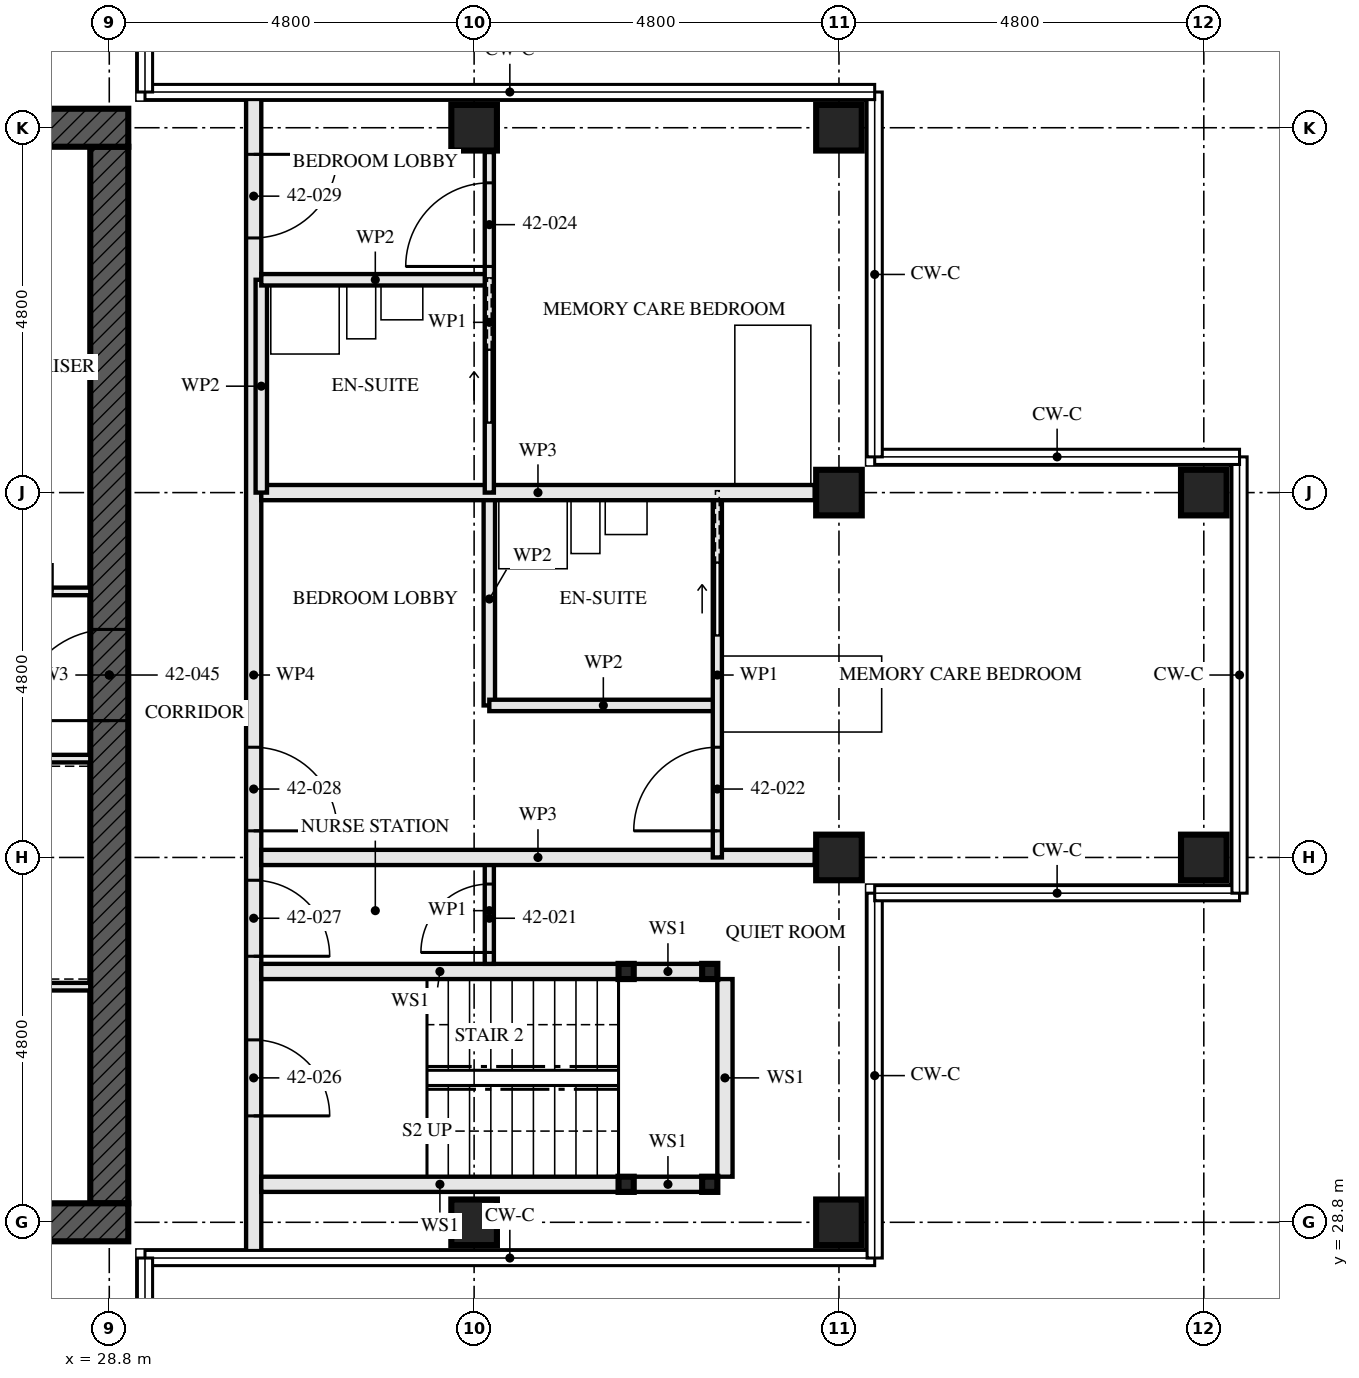
"""IFC4 building model, lengths in metres.
Left out: names, types, materials, properties, quantities, classifications, styles, units other than length and angle.
Written with IfcOpenShell. Run it as: python <this file> out.ifc"""

import sys

from ifc_helpers import new_model, si_unit, direction, frame, frame_2d, origin, origin_2d, place, context, subcontext, project, spatial, rectangle, hollow_rectangle, extrude, element, fill, save


model = new_model("IFC4")
c1 = context("Model", 3, precision=1e-05, world=origin(), true_north=direction((0.0, 1.0)))
c2 = subcontext(c1, "Body", "Model", "MODEL_VIEW")
j1 = project(units=[si_unit("LENGTHUNIT", "METRE"), si_unit("PLANEANGLEUNIT", "RADIAN")], contexts=[c1])
p1 = place(None, origin())
s1 = spatial("IfcSite", under=j1, at=p1, CompositionType="ELEMENT")
p2 = place(p1, origin())
s2 = spatial("IfcBuilding", under=s1, at=p2, CompositionType="ELEMENT")
p3 = place(p2, frame((0.0, 0.0, 155.0)))
s3 = spatial("IfcBuildingStorey", under=s2, at=p3, CompositionType="ELEMENT", Elevation=155.0)
for number, where, z_axis, x_axis in (
    (1, (33.6, 28.8, 0.0), (0.0, 0.0, 1.0), (0.0, 1.0, 0.0)),
    (2, (33.6, 43.2, 0.0), (0.0, 0.0, 1.0), (0.0, 1.0, 0.0)),
):
    element("IfcColumn", number, at=place(p3, frame(where, z_axis=z_axis, x_axis=x_axis)), inside=s3, PredefinedType="COLUMN", context=c2, shape_type="SweptSolid", body=[
        extrude(hollow_rectangle(XDim=0.6, YDim=0.6, WallThickness=0.08, at=origin_2d()), origin(), (0.0, 0.0, 1.0), 3.5),
    ])
for number, where, z_axis, x_axis in (
    (3, (38.4, 28.8, 0.0), (0.0, 0.0, 1.0), (0.0, 1.0, 0.0)),
    (4, (38.4, 33.6, 0.0), (0.0, 0.0, 1.0), (0.0, 1.0, 0.0)),
    (5, (38.4, 38.4, 0.0), (0.0, 0.0, 1.0), (0.0, 1.0, 0.0)),
    (6, (38.4, 43.2, 0.0), (0.0, 0.0, 1.0), (0.0, 1.0, 0.0)),
    (7, (43.2, 33.6, 0.0), (0.0, 0.0, 1.0), (0.0, 1.0, 0.0)),
    (8, (43.2, 38.4, 0.0), (0.0, 0.0, 1.0), (0.0, 1.0, 0.0)),
):
    element("IfcColumn", number, at=place(p3, frame(where, z_axis=z_axis, x_axis=x_axis)), inside=s3, PredefinedType="COLUMN", context=c2, shape_type="SweptSolid", body=[
        extrude(hollow_rectangle(XDim=0.6, YDim=0.6, WallThickness=0.06, at=origin_2d()), origin(), (0.0, 0.0, 1.0), 3.5),
    ])
p4 = place(p3, frame((14.15, 28.8, -0.17), z_axis=(0.0, 0.0, 1.0), x_axis=(1.0, 0.0, 0.0)))
e9 = element("IfcWall", 9, at=p4, inside=s3, PredefinedType="SHEAR", context=c2, shape_type="SweptSolid", body=[
    extrude(rectangle(XDim=14.9, YDim=0.5, at=frame_2d((7.45, 0.0))), origin(), (0.0, 0.0, 1.0), 3.5),
])
p5 = place(p4, frame((6.85, 0.0, 0.17)))
e10 = element("IfcOpeningElement", 10, at=p5, cuts=e9, PredefinedType="OPENING", context=c2, shape_type="SweptSolid", body=[
    extrude(rectangle(XDim=1.2, YDim=2.1, at=frame_2d((0.6, 1.05))), frame((0.0, 0.26, 0.0), z_axis=(0.0, -1.0, 0.0), x_axis=(1.0, 0.0, 0.0)), (0.0, 0.0, 1.0), 0.521),
])
p6 = place(p3, frame((29.05, 43.2, -0.17), z_axis=(0.0, 0.0, 1.0), x_axis=(-1.0, 0.0, 0.0)))
e11 = element("IfcWall", 11, at=p6, inside=s3, PredefinedType="SHEAR", context=c2, shape_type="SweptSolid", body=[
    extrude(rectangle(XDim=14.9, YDim=0.5, at=frame_2d((7.45, 0.0))), origin(), (0.0, 0.0, 1.0), 3.5),
])
p7 = place(p6, frame((6.85, 0.0, 0.17)))
e12 = element("IfcOpeningElement", 12, at=p7, cuts=e11, PredefinedType="OPENING", context=c2, shape_type="SweptSolid", body=[
    extrude(rectangle(XDim=1.2, YDim=2.1, at=frame_2d((0.6, 1.05))), frame((0.0, 0.26, 0.0), z_axis=(0.0, -1.0, 0.0), x_axis=(1.0, 0.0, 0.0)), (0.0, 0.0, 1.0), 0.521),
])
p8 = place(p3, frame((28.8, 29.05, -0.17), z_axis=(0.0, 0.0, 1.0), x_axis=(0.0, 1.0, 0.0)))
e13 = element("IfcWall", 13, at=p8, inside=s3, PredefinedType="SHEAR", context=c2, shape_type="SweptSolid", body=[
    extrude(rectangle(XDim=13.9, YDim=0.5, at=frame_2d((6.95, 0.0))), origin(), (0.0, 0.0, 1.0), 3.5),
])
p9 = place(p8, frame((6.35, 0.0, 0.17)))
e14 = element("IfcOpeningElement", 14, at=p9, cuts=e13, PredefinedType="OPENING", context=c2, shape_type="SweptSolid", body=[
    extrude(rectangle(XDim=1.2, YDim=2.1, at=frame_2d((0.6, 1.05))), frame((0.0, 0.26, 0.0), z_axis=(0.0, -1.0, 0.0), x_axis=(1.0, 0.0, 0.0)), (0.0, 0.0, 1.0), 0.521),
])
for number, where, z_axis, x_axis in (
    (15, (36.7, 29.3, 0.0), (0.0, 0.0, 1.0), (1.0, 0.0, 0.0)),
    (16, (36.7, 32.1, 0.0), (0.0, 0.0, 1.0), (1.0, 0.0, 0.0)),
    (17, (35.6, 29.3, 0.0), (0.0, 0.0, 1.0), (1.0, 0.0, 0.0)),
    (18, (35.6, 32.1, 0.0), (0.0, 0.0, 1.0), (1.0, 0.0, 0.0)),
):
    element("IfcColumn", number, at=place(p3, frame(where, z_axis=z_axis, x_axis=x_axis)), inside=s3, PredefinedType="COLUMN", context=c2, shape_type="SweptSolid", body=[
        extrude(hollow_rectangle(XDim=0.2, YDim=0.2, WallThickness=0.008, at=origin_2d()), origin(), (0.0, 0.0, 1.0), 3.33),
    ])
p10 = place(p3, frame((36.6, 29.3, 0.0), z_axis=(0.0, 0.0, 1.0), x_axis=(-1.0, 0.0, 0.0)))
e19 = element("IfcWall", 19, at=p10, inside=s3, PredefinedType="SOLIDWALL", context=c2, shape_type="SweptSolid", body=[
    extrude(rectangle(XDim=0.9, YDim=0.2, at=frame_2d((0.45, 0.0))), origin(), (0.0, 0.0, 1.0), 2.99),
])
p11 = place(p3, frame((35.5, 29.3, 0.0), z_axis=(0.0, 0.0, 1.0), x_axis=(-1.0, 0.0, 0.0)))
e20 = element("IfcWall", 20, at=p11, inside=s3, PredefinedType="SOLIDWALL", context=c2, shape_type="SweptSolid", body=[
    extrude(rectangle(XDim=4.7, YDim=0.2, at=frame_2d((2.35, 0.0))), origin(), (0.0, 0.0, 1.0), 2.99),
])
p12 = place(p3, frame((36.6, 32.1, 0.0), z_axis=(0.0, 0.0, 1.0), x_axis=(-1.0, 0.0, 0.0)))
e21 = element("IfcWall", 21, at=p12, inside=s3, PredefinedType="SOLIDWALL", context=c2, shape_type="SweptSolid", body=[
    extrude(rectangle(XDim=0.9, YDim=0.2, at=frame_2d((0.45, 0.0))), origin(), (0.0, 0.0, 1.0), 2.99),
])
p13 = place(p3, frame((35.5, 32.1, 0.0), z_axis=(0.0, 0.0, 1.0), x_axis=(-1.0, 0.0, 0.0)))
e22 = element("IfcWall", 22, at=p13, inside=s3, PredefinedType="SOLIDWALL", context=c2, shape_type="SweptSolid", body=[
    extrude(rectangle(XDim=4.7, YDim=0.2, at=frame_2d((2.35, 0.0))), origin(), (0.0, 0.0, 1.0), 2.99),
])
p14 = place(p3, frame((36.9, 29.4, 0.0), z_axis=(0.0, 0.0, 1.0), x_axis=(0.0, 1.0, 0.0)))
e23 = element("IfcWall", 23, at=p14, inside=s3, PredefinedType="SOLIDWALL", context=c2, shape_type="SweptSolid", body=[
    extrude(rectangle(XDim=2.6, YDim=0.2, at=frame_2d((1.3, 0.0))), origin(), (0.0, 0.0, 1.0), 3.33),
])
p15 = place(p3, frame((33.8, 32.2, 0.0), z_axis=(0.0, 0.0, 1.0), x_axis=(0.0, 1.0, 0.0)))
e24 = element("IfcWall", 24, at=p15, inside=s3, PredefinedType="PARTITIONING", context=c2, shape_type="SweptSolid", body=[
    extrude(rectangle(XDim=1.4, YDim=0.12, at=frame_2d((0.7, 0.0))), origin(), (0.0, 0.0, 1.0), 3.33),
])
p16 = place(p15, frame((0.15, 0.0, 0.0)))
e25 = element("IfcOpeningElement", 25, at=p16, cuts=e24, PredefinedType="OPENING", context=c2, shape_type="SweptSolid", body=[
    extrude(rectangle(XDim=0.9, YDim=2.1, at=frame_2d((0.45, 1.05))), frame((0.0, 0.071, 0.0), z_axis=(0.0, -1.0, 0.0), x_axis=(1.0, 0.0, 0.0)), (0.0, 0.0, 1.0), 0.141),
])
p17 = place(p3, frame((38.08, 33.6, 0.0), z_axis=(0.0, 0.0, 1.0), x_axis=(-1.0, 0.0, 0.0)))
e26 = element("IfcWall", 26, at=p17, inside=s3, PredefinedType="PARTITIONING", context=c2, shape_type="SweptSolid", body=[
    extrude(rectangle(XDim=7.28, YDim=0.2, at=frame_2d((3.64, 0.0))), origin(), (0.0, 0.0, 1.0), 2.55),
])
p18 = place(p3, frame((36.8, 35.6, 0.0), z_axis=(0.0, 0.0, 1.0), x_axis=(-1.0, 0.0, 0.0)))
e27 = element("IfcWall", 27, at=p18, inside=s3, PredefinedType="PARTITIONING", context=c2, shape_type="SweptSolid", body=[
    extrude(rectangle(XDim=3.0, YDim=0.15, at=frame_2d((1.5, 0.0))), origin(), (0.0, 0.0, 1.0), 3.33),
])
p19 = place(p3, frame((33.8, 35.6, 0.0), z_axis=(0.0, 0.0, 1.0), x_axis=(0.0, 1.0, 0.0)))
e28 = element("IfcWall", 28, at=p19, inside=s3, PredefinedType="PARTITIONING", context=c2, shape_type="SweptSolid", body=[
    extrude(rectangle(XDim=2.8, YDim=0.15, at=frame_2d((1.4, 0.0))), origin(), (0.0, 0.0, 1.0), 3.33),
])
p20 = place(p3, frame((36.8, 33.6, 0.0), z_axis=(0.0, 0.0, 1.0), x_axis=(0.0, 1.0, 0.0)))
e29 = element("IfcWall", 29, at=p20, inside=s3, PredefinedType="PARTITIONING", context=c2, shape_type="SweptSolid", body=[
    extrude(rectangle(XDim=4.8, YDim=0.12, at=frame_2d((2.4, 0.0))), origin(), (0.0, 0.0, 1.0), 3.33),
])
p21 = place(p20, frame((0.35, 0.0, 0.0)))
e30 = element("IfcOpeningElement", 30, at=p21, cuts=e29, PredefinedType="OPENING", context=c2, shape_type="SweptSolid", body=[
    extrude(rectangle(XDim=1.1, YDim=2.1, at=frame_2d((0.55, 1.05))), frame((0.0, 0.071, 0.0), z_axis=(0.0, -1.0, 0.0), x_axis=(1.0, 0.0, 0.0)), (0.0, 0.0, 1.0), 0.141),
])
p22 = place(p20, frame((2.925, 0.0, 0.0)))
e31 = element("IfcOpeningElement", 31, at=p22, cuts=e29, PredefinedType="OPENING", context=c2, shape_type="SweptSolid", body=[
    extrude(rectangle(XDim=0.95, YDim=2.1, at=frame_2d((0.475, 1.05))), frame((0.0, 0.071, 0.0), z_axis=(0.0, -1.0, 0.0), x_axis=(1.0, 0.0, 0.0)), (0.0, 0.0, 1.0), 0.141),
])
p23 = place(p3, frame((38.08, 38.4, 0.0), z_axis=(0.0, 0.0, 1.0), x_axis=(-1.0, 0.0, 0.0)))
e32 = element("IfcWall", 32, at=p23, inside=s3, PredefinedType="PARTITIONING", context=c2, shape_type="SweptSolid", body=[
    extrude(rectangle(XDim=7.28, YDim=0.2, at=frame_2d((3.64, 0.0))), origin(), (0.0, 0.0, 1.0), 2.55),
])
p24 = place(p3, frame((33.8, 41.2, 0.0), z_axis=(0.0, 0.0, 1.0), x_axis=(-1.0, 0.0, 0.0)))
e33 = element("IfcWall", 33, at=p24, inside=s3, PredefinedType="PARTITIONING", context=c2, shape_type="SweptSolid", body=[
    extrude(rectangle(XDim=3.0, YDim=0.15, at=frame_2d((1.5, 0.0))), origin(), (0.0, 0.0, 1.0), 3.33),
])
p25 = place(p3, frame((30.8, 38.4, 0.0), z_axis=(0.0, 0.0, 1.0), x_axis=(0.0, 1.0, 0.0)))
e34 = element("IfcWall", 34, at=p25, inside=s3, PredefinedType="PARTITIONING", context=c2, shape_type="SweptSolid", body=[
    extrude(rectangle(XDim=2.8, YDim=0.15, at=frame_2d((1.4, 0.0))), origin(), (0.0, 0.0, 1.0), 3.33),
])
p26 = place(p3, frame((33.8, 38.4, 0.0), z_axis=(0.0, 0.0, 1.0), x_axis=(0.0, 1.0, 0.0)))
e35 = element("IfcWall", 35, at=p26, inside=s3, PredefinedType="PARTITIONING", context=c2, shape_type="SweptSolid", body=[
    extrude(rectangle(XDim=4.48, YDim=0.12, at=frame_2d((2.24, 0.0))), origin(), (0.0, 0.0, 1.0), 3.33),
])
p27 = place(p26, frame((2.975, 0.0, 0.0)))
e36 = element("IfcOpeningElement", 36, at=p27, cuts=e35, PredefinedType="OPENING", context=c2, shape_type="SweptSolid", body=[
    extrude(rectangle(XDim=1.1, YDim=2.1, at=frame_2d((0.55, 1.05))), frame((0.0, 0.071, 0.0), z_axis=(0.0, -1.0, 0.0), x_axis=(1.0, 0.0, 0.0)), (0.0, 0.0, 1.0), 0.141),
])
p28 = place(p26, frame((0.925, 0.0, 0.0)))
e37 = element("IfcOpeningElement", 37, at=p28, cuts=e35, PredefinedType="OPENING", context=c2, shape_type="SweptSolid", body=[
    extrude(rectangle(XDim=0.95, YDim=2.1, at=frame_2d((0.475, 1.05))), frame((0.0, 0.071, 0.0), z_axis=(0.0, -1.0, 0.0), x_axis=(1.0, 0.0, 0.0)), (0.0, 0.0, 1.0), 0.141),
])
p29 = place(p3, frame((30.7, 28.35, 0.0), z_axis=(0.0, 0.0, 1.0), x_axis=(0.0, 1.0, 0.0)))
e38 = element("IfcWall", 38, at=p29, inside=s3, PredefinedType="PARTITIONING", context=c2, shape_type="SweptSolid", body=[
    extrude(rectangle(XDim=15.3, YDim=0.2, at=frame_2d((7.65, 0.0))), origin(), (0.0, 0.0, 1.0), 2.32),
])
p30 = place(p29, frame((1.85, 0.0, 0.0)))
e39 = element("IfcOpeningElement", 39, at=p30, cuts=e38, PredefinedType="OPENING", context=c2, shape_type="SweptSolid", body=[
    extrude(rectangle(XDim=1.0, YDim=2.1, at=frame_2d((0.5, 1.05))), frame((0.0, 0.111, 0.0), z_axis=(0.0, -1.0, 0.0), x_axis=(1.0, 0.0, 0.0)), (0.0, 0.0, 1.0), 0.221),
])
p31 = place(p29, frame((3.95, 0.0, 0.0)))
e40 = element("IfcOpeningElement", 40, at=p31, cuts=e38, PredefinedType="OPENING", context=c2, shape_type="SweptSolid", body=[
    extrude(rectangle(XDim=1.0, YDim=2.1, at=frame_2d((0.5, 1.05))), frame((0.0, 0.111, 0.0), z_axis=(0.0, -1.0, 0.0), x_axis=(1.0, 0.0, 0.0)), (0.0, 0.0, 1.0), 0.221),
])
p32 = place(p29, frame((5.6, 0.0, 0.0)))
e41 = element("IfcOpeningElement", 41, at=p32, cuts=e38, PredefinedType="OPENING", context=c2, shape_type="SweptSolid", body=[
    extrude(rectangle(XDim=1.1, YDim=2.1, at=frame_2d((0.55, 1.05))), frame((0.0, 0.111, 0.0), z_axis=(0.0, -1.0, 0.0), x_axis=(1.0, 0.0, 0.0)), (0.0, 0.0, 1.0), 0.221),
])
p33 = place(p29, frame((13.4, 0.0, 0.0)))
e42 = element("IfcOpeningElement", 42, at=p33, cuts=e38, PredefinedType="OPENING", context=c2, shape_type="SweptSolid", body=[
    extrude(rectangle(XDim=1.1, YDim=2.1, at=frame_2d((0.55, 1.05))), frame((0.0, 0.111, 0.0), z_axis=(0.0, -1.0, 0.0), x_axis=(1.0, 0.0, 0.0)), (0.0, 0.0, 1.0), 0.221),
])
p34 = place(p3, frame((23.05, 34.9, 0.0), z_axis=(0.0, 0.0, 1.0), x_axis=(1.0, 0.0, 0.0)))
e43 = element("IfcWall", 43, at=p34, inside=s3, PredefinedType="SOLIDWALL", context=c2, shape_type="SweptSolid", body=[
    extrude(rectangle(XDim=5.5, YDim=0.1, at=frame_2d((2.75, 0.0))), origin(), (0.0, 0.0, 1.0), 3.33),
])
p35 = place(p34, frame((0.85, 0.0, 0.0)))
e44 = element("IfcOpeningElement", 44, at=p35, cuts=e43, PredefinedType="OPENING", context=c2, shape_type="SweptSolid", body=[
    extrude(rectangle(XDim=1.0, YDim=2.1, at=frame_2d((0.5, 1.05))), frame((0.0, 0.061, 0.0), z_axis=(0.0, -1.0, 0.0), x_axis=(1.0, 0.0, 0.0)), (0.0, 0.0, 1.0), 0.121),
])
p36 = place(p34, frame((3.625, 0.0, 0.0)))
e45 = element("IfcOpeningElement", 45, at=p36, cuts=e43, PredefinedType="OPENING", context=c2, shape_type="SweptSolid", body=[
    extrude(rectangle(XDim=1.0, YDim=2.1, at=frame_2d((0.5, 1.05))), frame((0.0, 0.061, 0.0), z_axis=(0.0, -1.0, 0.0), x_axis=(1.0, 0.0, 0.0)), (0.0, 0.0, 1.0), 0.121),
])
p37 = place(p3, frame((22.65, 37.1, 0.0), z_axis=(0.0, 0.0, 1.0), x_axis=(1.0, 0.0, 0.0)))
e46 = element("IfcWall", 46, at=p37, inside=s3, PredefinedType="SOLIDWALL", context=c2, shape_type="SweptSolid", body=[
    extrude(rectangle(XDim=5.9, YDim=0.1, at=frame_2d((2.95, 0.0))), origin(), (0.0, 0.0, 1.0), 3.33),
])
p38 = place(p37, frame((3.1, 0.0, 0.0)))
e47 = element("IfcOpeningElement", 47, at=p38, cuts=e46, PredefinedType="OPENING", context=c2, shape_type="SweptSolid", body=[
    extrude(rectangle(XDim=1.0, YDim=2.1, at=frame_2d((0.5, 1.05))), frame((0.0, 0.061, 0.0), z_axis=(0.0, -1.0, 0.0), x_axis=(1.0, 0.0, 0.0)), (0.0, 0.0, 1.0), 0.121),
])
p39 = place(p37, frame((4.7, 0.0, 0.0)))
e48 = element("IfcOpeningElement", 48, at=p39, cuts=e46, PredefinedType="OPENING", context=c2, shape_type="SweptSolid", body=[
    extrude(rectangle(XDim=0.7, YDim=2.1, at=frame_2d((0.35, 1.05))), frame((0.0, 0.061, 0.0), z_axis=(0.0, -1.0, 0.0), x_axis=(1.0, 0.0, 0.0)), (0.0, 0.0, 1.0), 0.121),
])
p40 = place(p3, frame((23.15, 31.9, 0.0), z_axis=(0.0, 0.0, 1.0), x_axis=(1.0, 0.0, 0.0)))
e49 = element("IfcWall", 49, at=p40, inside=s3, PredefinedType="SOLIDWALL", context=c2, shape_type="SweptSolid", body=[
    extrude(rectangle(XDim=5.4, YDim=0.1, at=frame_2d((2.7, 0.0))), origin(), (0.0, 0.0, 1.0), 3.33),
])
p41 = place(p16, origin())
e50 = element("IfcDoor", 50, at=p41, inside=s3, OperationType="SINGLE_SWING_RIGHT", PredefinedType="DOOR", context=c2, shape_type="SweptSolid", body=[
    extrude(rectangle(XDim=0.9, YDim=2.1, at=frame_2d((0.45, 1.05))), frame((0.0, 0.022, 0.0), z_axis=(0.0, -1.0, 0.0), x_axis=(1.0, 0.0, 0.0)), (0.0, 0.0, 1.0), 0.044),
])
fill(e25, e50)
p42 = place(p21, origin())
e51 = element("IfcDoor", 51, at=p42, inside=s3, OperationType="SINGLE_SWING_RIGHT", PredefinedType="DOOR", context=c2, shape_type="SweptSolid", body=[
    extrude(rectangle(XDim=1.1, YDim=2.1, at=frame_2d((0.55, 1.05))), frame((0.0, 0.022, 0.0), z_axis=(0.0, -1.0, 0.0), x_axis=(1.0, 0.0, 0.0)), (0.0, 0.0, 1.0), 0.044),
])
fill(e30, e51)
p43 = place(p22, origin())
e52 = element("IfcDoor", 52, at=p43, inside=s3, OperationType="SLIDING_TO_LEFT", PredefinedType="DOOR", context=c2, shape_type="SweptSolid", body=[
    extrude(rectangle(XDim=0.95, YDim=2.1, at=frame_2d((0.475, 1.05))), frame((0.0, 0.022, 0.0), z_axis=(0.0, -1.0, 0.0), x_axis=(1.0, 0.0, 0.0)), (0.0, 0.0, 1.0), 0.044),
])
fill(e31, e52)
p44 = place(p27, origin())
e53 = element("IfcDoor", 53, at=p44, inside=s3, OperationType="SINGLE_SWING_RIGHT", PredefinedType="DOOR", context=c2, shape_type="SweptSolid", body=[
    extrude(rectangle(XDim=1.1, YDim=2.1, at=frame_2d((0.55, 1.05))), frame((0.0, 0.022, 0.0), z_axis=(0.0, -1.0, 0.0), x_axis=(1.0, 0.0, 0.0)), (0.0, 0.0, 1.0), 0.044),
])
fill(e36, e53)
p45 = place(p28, origin())
e54 = element("IfcDoor", 54, at=p45, inside=s3, OperationType="SLIDING_TO_LEFT", PredefinedType="DOOR", context=c2, shape_type="SweptSolid", body=[
    extrude(rectangle(XDim=0.95, YDim=2.1, at=frame_2d((0.475, 1.05))), frame((0.0, 0.022, 0.0), z_axis=(0.0, -1.0, 0.0), x_axis=(1.0, 0.0, 0.0)), (0.0, 0.0, 1.0), 0.044),
])
fill(e37, e54)
p46 = place(p30, frame((1.0, 0.0, 0.0), z_axis=(0.0, 0.0, 1.0), x_axis=(-1.0, 0.0, 0.0)))
e55 = element("IfcDoor", 55, at=p46, inside=s3, OperationType="SINGLE_SWING_LEFT", PredefinedType="DOOR", context=c2, shape_type="SweptSolid", body=[
    extrude(rectangle(XDim=1.0, YDim=2.1, at=frame_2d((0.5, 1.05))), frame((0.0, 0.032, 0.0), z_axis=(0.0, -1.0, 0.0), x_axis=(1.0, 0.0, 0.0)), (0.0, 0.0, 1.0), 0.064),
])
fill(e39, e55)
p47 = place(p31, frame((1.0, 0.0, 0.0), z_axis=(0.0, 0.0, 1.0), x_axis=(-1.0, 0.0, 0.0)))
e56 = element("IfcDoor", 56, at=p47, inside=s3, OperationType="SINGLE_SWING_LEFT", PredefinedType="DOOR", context=c2, shape_type="SweptSolid", body=[
    extrude(rectangle(XDim=1.0, YDim=2.1, at=frame_2d((0.5, 1.05))), frame((0.0, 0.027, 0.0), z_axis=(0.0, -1.0, 0.0), x_axis=(1.0, 0.0, 0.0)), (0.0, 0.0, 1.0), 0.054),
])
fill(e40, e56)
p48 = place(p32, frame((1.1, 0.0, 0.0), z_axis=(0.0, 0.0, 1.0), x_axis=(-1.0, 0.0, 0.0)))
e57 = element("IfcDoor", 57, at=p48, inside=s3, OperationType="SINGLE_SWING_LEFT", PredefinedType="DOOR", context=c2, shape_type="SweptSolid", body=[
    extrude(rectangle(XDim=1.1, YDim=2.1, at=frame_2d((0.55, 1.05))), frame((0.0, 0.027, 0.0), z_axis=(0.0, -1.0, 0.0), x_axis=(1.0, 0.0, 0.0)), (0.0, 0.0, 1.0), 0.054),
])
fill(e41, e57)
p49 = place(p33, frame((1.1, 0.0, 0.0), z_axis=(0.0, 0.0, 1.0), x_axis=(-1.0, 0.0, 0.0)))
e58 = element("IfcDoor", 58, at=p49, inside=s3, OperationType="SINGLE_SWING_RIGHT", PredefinedType="DOOR", context=c2, shape_type="SweptSolid", body=[
    extrude(rectangle(XDim=1.1, YDim=2.1, at=frame_2d((0.55, 1.05))), frame((0.0, 0.027, 0.0), z_axis=(0.0, -1.0, 0.0), x_axis=(1.0, 0.0, 0.0)), (0.0, 0.0, 1.0), 0.054),
])
fill(e42, e58)
p50 = place(p9, origin())
e59 = element("IfcDoor", 59, at=p50, inside=s3, OperationType="SINGLE_SWING_LEFT", PredefinedType="DOOR", context=c2, shape_type="SweptSolid", body=[
    extrude(rectangle(XDim=1.2, YDim=2.1, at=frame_2d((0.6, 1.05))), frame((0.0, 0.027, 0.0), z_axis=(0.0, -1.0, 0.0), x_axis=(1.0, 0.0, 0.0)), (0.0, 0.0, 1.0), 0.054),
])
fill(e14, e59)
save(model, sys.argv[1])
